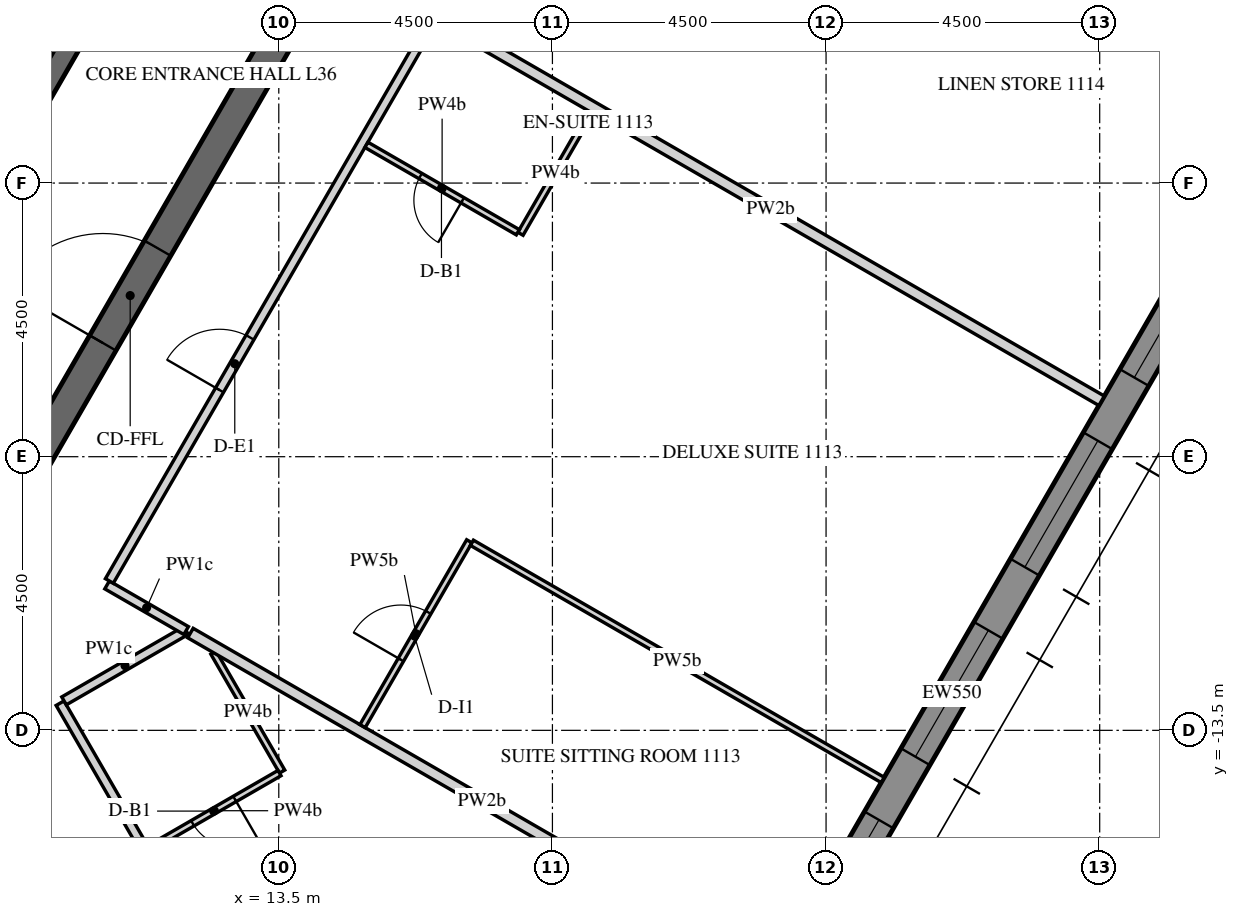
"""IFC4 building model, lengths in metres.
Left out: names, types, materials, properties, quantities, classifications, styles, units other than length and angle.
Written with IfcOpenShell. Run it as: python <this file> out.ifc"""

import sys

from ifc_helpers import new_model, si_unit, direction, frame, frame_2d, origin, place, context, subcontext, project, spatial, polyline, rectangle, outline, extrude, element, fill, save


model = new_model("IFC4")
c1 = context("Model", 3, precision=1e-05, world=origin(), true_north=direction((0.0, 1.0)))
c2 = subcontext(c1, "Body", "Model", "MODEL_VIEW")
j1 = project(units=[si_unit("LENGTHUNIT", "METRE"), si_unit("PLANEANGLEUNIT", "RADIAN")], contexts=[c1])
p1 = place(None, origin())
s1 = spatial("IfcSite", under=j1, at=p1, CompositionType="ELEMENT")
p2 = place(p1, origin())
s2 = spatial("IfcBuilding", under=s1, at=p2, CompositionType="ELEMENT")
p3 = place(p2, frame((0.0, 0.0, 156.6)))
s3 = spatial("IfcBuildingStorey", under=s2, at=p3, CompositionType="ELEMENT", Elevation=156.6)
p4 = place(p3, frame((17.63, -24.914, -0.15), z_axis=(0.0, 0.0, 1.0), x_axis=(0.499998569178, 0.866026229868, 0.0)))
e1 = element("IfcWall", 1, at=p4, inside=s3, PredefinedType="SOLIDWALL", context=c2, shape_type="SweptSolid", body=[
    extrude(outline(polyline([(-0.022, -0.275), (27.783, -0.275), (27.732, 0.275), (0.022, 0.275), (-0.022, -0.275)])), origin(), (0.0, 0.0, 1.0), 3.9),
])
p5 = place(p4, frame((1.879, 0.0, 1.05)))
e2 = element("IfcOpeningElement", 2, at=p5, cuts=e1, PredefinedType="OPENING", context=c2, shape_type="SweptSolid", body=[
    extrude(rectangle(XDim=2.4, YDim=2.4, at=frame_2d((1.2, 1.2))), frame((0.0, 0.285, 0.0), z_axis=(0.0, -1.0, 0.0), x_axis=(1.0, 0.0, 0.0)), (0.0, 0.0, 1.0), 0.57),
])
p6 = place(p4, frame((5.479, 0.0, 1.05)))
e3 = element("IfcOpeningElement", 3, at=p6, cuts=e1, PredefinedType="OPENING", context=c2, shape_type="SweptSolid", body=[
    extrude(rectangle(XDim=2.4, YDim=2.4, at=frame_2d((1.2, 1.2))), frame((0.0, 0.285, 0.0), z_axis=(0.0, -1.0, 0.0), x_axis=(1.0, 0.0, 0.0)), (0.0, 0.0, 1.0), 0.57),
])
p7 = place(p4, frame((9.079, 0.0, 1.05)))
e4 = element("IfcOpeningElement", 4, at=p7, cuts=e1, PredefinedType="OPENING", context=c2, shape_type="SweptSolid", body=[
    extrude(rectangle(XDim=2.4, YDim=2.4, at=frame_2d((1.2, 1.2))), frame((0.0, 0.285, 0.0), z_axis=(0.0, -1.0, 0.0), x_axis=(1.0, 0.0, 0.0)), (0.0, 0.0, 1.0), 0.57),
])
p8 = place(p4, frame((12.679, 0.0, 1.05)))
e5 = element("IfcOpeningElement", 5, at=p8, cuts=e1, PredefinedType="OPENING", context=c2, shape_type="SweptSolid", body=[
    extrude(rectangle(XDim=2.4, YDim=2.4, at=frame_2d((1.2, 1.2))), frame((0.0, 0.285, 0.0), z_axis=(0.0, -1.0, 0.0), x_axis=(1.0, 0.0, 0.0)), (0.0, 0.0, 1.0), 0.57),
])
p9 = place(p4, frame((16.279, 0.0, 1.05)))
e6 = element("IfcOpeningElement", 6, at=p9, cuts=e1, PredefinedType="OPENING", context=c2, shape_type="SweptSolid", body=[
    extrude(rectangle(XDim=2.4, YDim=2.4, at=frame_2d((1.2, 1.2))), frame((0.0, 0.285, 0.0), z_axis=(0.0, -1.0, 0.0), x_axis=(1.0, 0.0, 0.0)), (0.0, 0.0, 1.0), 0.57),
])
p10 = place(p4, frame((19.879, 0.0, 1.05)))
e7 = element("IfcOpeningElement", 7, at=p10, cuts=e1, PredefinedType="OPENING", context=c2, shape_type="SweptSolid", body=[
    extrude(rectangle(XDim=2.4, YDim=2.4, at=frame_2d((1.2, 1.2))), frame((0.0, 0.285, 0.0), z_axis=(0.0, -1.0, 0.0), x_axis=(1.0, 0.0, 0.0)), (0.0, 0.0, 1.0), 0.57),
])
p11 = place(p4, frame((23.479, 0.0, 1.05)))
e8 = element("IfcOpeningElement", 8, at=p11, cuts=e1, PredefinedType="OPENING", context=c2, shape_type="SweptSolid", body=[
    extrude(rectangle(XDim=2.4, YDim=2.4, at=frame_2d((1.2, 1.2))), frame((0.0, 0.285, 0.0), z_axis=(0.0, -1.0, 0.0), x_axis=(1.0, 0.0, 0.0)), (0.0, 0.0, 1.0), 0.57),
])
p12 = place(p3, frame((7.361, -12.75, -0.15), z_axis=(0.0, 0.0, 1.0), x_axis=(0.50000571537, 0.866022103989, 0.0)))
e9 = element("IfcWall", 9, at=p12, inside=s3, PredefinedType="SHEAR", context=c2, shape_type="SweptSolid", body=[
    extrude(outline(polyline([(-0.144, -0.25), (14.867, -0.25), (14.578, 0.25), (0.144, 0.25), (-0.144, -0.25)])), origin(), (0.0, 0.0, 1.0), 3.9),
])
p13 = place(p12, frame((6.49, 0.0, 0.15)))
e10 = element("IfcOpeningElement", 10, at=p13, cuts=e9, PredefinedType="OPENING", context=c2, shape_type="SweptSolid", body=[
    extrude(rectangle(XDim=1.8, YDim=2.4, at=frame_2d((0.9, 1.2))), frame((0.0, 0.26, 0.0), z_axis=(0.0, -1.0, 0.0), x_axis=(1.0, 0.0, 0.0)), (0.0, 0.0, 1.0), 0.52),
])
p14 = place(p3, frame((7.506, -13.0, -0.15), z_axis=(0.0, 0.0, 1.0), x_axis=(0.499988271576, -0.866032175087, 0.0)))
e11 = element("IfcWall", 11, at=p14, inside=s3, PredefinedType="SHEAR", context=c2, shape_type="SweptSolid", body=[
    extrude(rectangle(XDim=15.424, YDim=0.5, at=frame_2d((7.712, 0.0))), origin(), (0.0, 0.0, 1.0), 3.9),
])
p15 = place(p14, frame((6.812, 0.0, 0.15)))
e12 = element("IfcOpeningElement", 12, at=p15, cuts=e11, PredefinedType="OPENING", context=c2, shape_type="SweptSolid", body=[
    extrude(rectangle(XDim=1.8, YDim=2.4, at=frame_2d((0.9, 1.2))), frame((0.0, 0.26, 0.0), z_axis=(0.0, -1.0, 0.0), x_axis=(1.0, 0.0, 0.0)), (0.0, 0.0, 1.0), 0.52),
])
p16 = place(p3, frame((5.673, -9.825, -0.15), z_axis=(0.0, 0.0, 1.0), x_axis=(0.499995046907, 0.866028263435, 0.0)))
e13 = element("IfcWall", 13, at=p16, inside=s3, PredefinedType="SHEAR", context=c2, shape_type="SweptSolid", body=[
    extrude(outline(polyline([(-0.101, -0.175), (11.446, -0.175), (11.244, 0.175), (0.101, 0.175), (-0.101, -0.175)])), origin(), (0.0, 0.0, 1.0), 3.9),
])
p17 = place(p16, frame((4.801, 0.0, 0.15)))
e14 = element("IfcOpeningElement", 14, at=p17, cuts=e13, PredefinedType="OPENING", context=c2, shape_type="SweptSolid", body=[
    extrude(rectangle(XDim=1.8, YDim=2.4, at=frame_2d((0.9, 1.2))), frame((0.0, 0.185, 0.0), z_axis=(0.0, -1.0, 0.0), x_axis=(1.0, 0.0, 0.0)), (0.0, 0.0, 1.0), 0.37),
])
p18 = place(p3, frame((6.178, -14.8, 0.0), z_axis=(0.0, 0.0, 1.0), x_axis=(0.499984309814, -0.866034462328, 0.0)))
e15 = element("IfcWall", 15, at=p18, inside=s3, PredefinedType="PARTITIONING", context=c2, shape_type="SweptSolid", body=[
    extrude(rectangle(XDim=8.017, YDim=0.15, at=frame_2d((4.008, 0.0))), origin(), (0.0, 0.0, 1.0), 2.823),
])
p19 = place(p3, frame((13.699, -19.628, 0.0), z_axis=(0.0, 0.0, 1.0), x_axis=(-0.499998968938, 0.866025999068, 0.0)))
e16 = element("IfcWall", 16, at=p19, inside=s3, PredefinedType="PARTITIONING", context=c2, shape_type="SweptSolid", body=[
    extrude(rectangle(XDim=7.592, YDim=0.15, at=frame_2d((3.796, 0.0))), origin(), (0.0, 0.0, 1.0), 2.823),
])
p20 = place(p19, frame((2.033, 0.0, 0.0)))
e17 = element("IfcOpeningElement", 17, at=p20, cuts=e16, PredefinedType="OPENING", context=c2, shape_type="SweptSolid", body=[
    extrude(rectangle(XDim=1.0, YDim=2.1, at=frame_2d((0.5, 1.05))), frame((0.0, 0.085, 0.0), z_axis=(0.0, -1.0, 0.0), x_axis=(1.0, 0.0, 0.0)), (0.0, 0.0, 1.0), 0.17),
])
p21 = place(p3, frame((9.968, -13.016, 0.0), z_axis=(0.0, 0.0, 1.0), x_axis=(0.866022320763, 0.500005339912, 0.0)))
e18 = element("IfcWall", 18, at=p21, inside=s3, PredefinedType="PARTITIONING", context=c2, shape_type="SweptSolid", body=[
    extrude(rectangle(XDim=2.316, YDim=0.15, at=frame_2d((1.158, 0.0))), origin(), (0.0, 0.0, 1.0), 2.823),
])
p22 = place(p3, frame((11.977, -11.859, 0.0), z_axis=(0.0, 0.0, 1.0), x_axis=(-0.865993364801, 0.500055489042, 0.0)))
e19 = element("IfcWall", 19, at=p22, inside=s3, PredefinedType="PARTITIONING", context=c2, shape_type="SweptSolid", body=[
    extrude(rectangle(XDim=1.502, YDim=0.15, at=frame_2d((0.751, 0.0))), origin(), (0.0, 0.0, 1.0), 2.823),
])
p23 = place(p3, frame((10.714, -11.043, 0.0), z_axis=(0.0, 0.0, 1.0), x_axis=(0.500001980452, 0.866024260367, 0.0)))
e20 = element("IfcWall", 20, at=p23, inside=s3, PredefinedType="PARTITIONING", context=c2, shape_type="SweptSolid", body=[
    extrude(rectangle(XDim=12.752, YDim=0.15, at=frame_2d((6.376, 0.0))), origin(), (0.0, 0.0, 1.0), 2.823),
])
p24 = place(p23, frame((3.625, 0.0, 0.0)))
e21 = element("IfcOpeningElement", 21, at=p24, cuts=e20, PredefinedType="OPENING", context=c2, shape_type="SweptSolid", body=[
    extrude(rectangle(XDim=1.0, YDim=2.1, at=frame_2d((0.5, 1.05))), frame((0.0, 0.085, 0.0), z_axis=(0.0, -1.0, 0.0), x_axis=(1.0, 0.0, 0.0)), (0.0, 0.0, 1.0), 0.17),
])
p25 = place(p23, frame((11.602, 0.0, 0.0)))
e22 = element("IfcOpeningElement", 22, at=p25, cuts=e20, PredefinedType="OPENING", context=c2, shape_type="SweptSolid", body=[
    extrude(rectangle(XDim=1.0, YDim=2.1, at=frame_2d((0.5, 1.05))), frame((0.0, 0.085, 0.0), z_axis=(0.0, -1.0, 0.0), x_axis=(1.0, 0.0, 0.0)), (0.0, 0.0, 1.0), 0.17),
])
p26 = place(p3, frame((12.426, -12.223, 0.0), z_axis=(0.0, 0.0, 1.0), x_axis=(0.499919032186, -0.866072145528, 0.0)))
e23 = element("IfcWall", 23, at=p26, inside=s3, PredefinedType="PARTITIONING", context=c2, shape_type="SweptSolid", body=[
    extrude(rectangle(XDim=2.258, YDim=0.1, at=frame_2d((1.129, 0.0))), origin(), (0.0, 0.0, 1.0), 2.823),
])
p27 = place(p3, frame((13.512, -14.203, 0.0), z_axis=(0.0, 0.0, 1.0), x_axis=(-0.866006523861, -0.500032699561, 0.0)))
e24 = element("IfcWall", 24, at=p27, inside=s3, PredefinedType="PARTITIONING", context=c2, shape_type="SweptSolid", body=[
    extrude(rectangle(XDim=2.475, YDim=0.1, at=frame_2d((1.237, 0.0))), origin(), (0.0, 0.0, 1.0), 2.823),
])
p28 = place(p27, frame((0.85, 0.0, 0.0)))
e25 = element("IfcOpeningElement", 25, at=p28, cuts=e24, PredefinedType="OPENING", context=c2, shape_type="SweptSolid", body=[
    extrude(rectangle(XDim=0.8, YDim=2.1, at=frame_2d((0.4, 1.05))), frame((0.0, 0.06, 0.0), z_axis=(0.0, -1.0, 0.0), x_axis=(1.0, 0.0, 0.0)), (0.0, 0.0, 1.0), 0.12),
])
p29 = place(p3, frame((21.631, -17.433, 0.0), z_axis=(0.0, 0.0, 1.0), x_axis=(-0.866031296205, 0.499989793889, 0.0)))
e26 = element("IfcWall", 26, at=p29, inside=s3, PredefinedType="PARTITIONING", context=c2, shape_type="SweptSolid", body=[
    extrude(rectangle(XDim=11.067, YDim=0.18, at=frame_2d((5.534, 0.0))), origin(), (0.0, 0.0, 1.0), 2.823),
])
p30 = place(p3, frame((18.629, -3.333, 0.0), z_axis=(0.0, 0.0, 1.0), x_axis=(-0.500015210774, -0.866016621662, 0.0)))
e27 = element("IfcWall", 27, at=p30, inside=s3, PredefinedType="PARTITIONING", context=c2, shape_type="SweptSolid", body=[
    extrude(rectangle(XDim=2.31, YDim=0.1, at=frame_2d((1.155, 0.0))), origin(), (0.0, 0.0, 1.0), 2.823),
])
p31 = place(p3, frame((17.431, -5.309, 0.0), z_axis=(0.0, 0.0, 1.0), x_axis=(-0.866018712932, 0.500011588718, 0.0)))
e28 = element("IfcWall", 28, at=p31, inside=s3, PredefinedType="PARTITIONING", context=c2, shape_type="SweptSolid", body=[
    extrude(rectangle(XDim=2.875, YDim=0.1, at=frame_2d((1.438, 0.0))), origin(), (0.0, 0.0, 1.0), 2.823),
])
p32 = place(p31, frame((1.05, 0.0, 0.0)))
e29 = element("IfcOpeningElement", 29, at=p32, cuts=e28, PredefinedType="OPENING", context=c2, shape_type="SweptSolid", body=[
    extrude(rectangle(XDim=0.8, YDim=2.1, at=frame_2d((0.4, 1.05))), frame((0.0, 0.06, 0.0), z_axis=(0.0, -1.0, 0.0), x_axis=(1.0, 0.0, 0.0)), (0.0, 0.0, 1.0), 0.12),
])
p33 = place(p3, frame((14.878, -13.43, 0.0), z_axis=(0.0, 0.0, 1.0), x_axis=(0.500021481416, 0.866013001128, 0.0)))
e30 = element("IfcWall", 30, at=p33, inside=s3, PredefinedType="PARTITIONING", context=c2, shape_type="SweptSolid", body=[
    extrude(rectangle(XDim=3.51, YDim=0.1, at=frame_2d((1.755, 0.0))), origin(), (0.0, 0.0, 1.0), 2.823),
])
p34 = place(p33, frame((1.26, 0.0, 0.0)))
e31 = element("IfcOpeningElement", 31, at=p34, cuts=e30, PredefinedType="OPENING", context=c2, shape_type="SweptSolid", body=[
    extrude(rectangle(XDim=0.9, YDim=2.1, at=frame_2d((0.45, 1.05))), frame((0.0, 0.06, 0.0), z_axis=(0.0, -1.0, 0.0), x_axis=(1.0, 0.0, 0.0)), (0.0, 0.0, 1.0), 0.12),
])
p35 = place(p3, frame((16.676, -10.416, 0.0), z_axis=(0.0, 0.0, 1.0), x_axis=(0.866034953203, -0.499983459557, 0.0)))
e32 = element("IfcWall", 32, at=p35, inside=s3, PredefinedType="PARTITIONING", context=c2, shape_type="SweptSolid", body=[
    extrude(rectangle(XDim=7.8, YDim=0.1, at=frame_2d((3.9, 0.0))), origin(), (0.0, 0.0, 1.0), 2.823),
])
p36 = place(p3, frame((27.031, -8.08, 0.0), z_axis=(0.0, 0.0, 1.0), x_axis=(-0.86602780907, 0.499995833901, 0.0)))
e33 = element("IfcWall", 33, at=p36, inside=s3, PredefinedType="PARTITIONING", context=c2, shape_type="SweptSolid", body=[
    extrude(rectangle(XDim=12.575, YDim=0.18, at=frame_2d((6.287, 0.0))), origin(), (0.0, 0.0, 1.0), 2.823),
])
p37 = place(p7, frame((0.0, 0.205, 0.0)))
e34 = element("IfcWindow", 34, at=p37, inside=s3, PartitioningType="DOUBLE_PANEL_VERTICAL", PredefinedType="WINDOW", context=c2, shape_type="SweptSolid", body=[
    extrude(rectangle(XDim=2.4, YDim=2.4, at=frame_2d((1.2, 1.2))), frame((0.0, 0.03, 0.0), z_axis=(0.0, -1.0, 0.0), x_axis=(1.0, 0.0, 0.0)), (0.0, 0.0, 1.0), 0.06),
])
fill(e4, e34)
p38 = place(p8, frame((0.0, 0.205, 0.0)))
e35 = element("IfcWindow", 35, at=p38, inside=s3, PartitioningType="DOUBLE_PANEL_VERTICAL", PredefinedType="WINDOW", context=c2, shape_type="SweptSolid", body=[
    extrude(rectangle(XDim=2.4, YDim=2.4, at=frame_2d((1.2, 1.2))), frame((0.0, 0.03, 0.0), z_axis=(0.0, -1.0, 0.0), x_axis=(1.0, 0.0, 0.0)), (0.0, 0.0, 1.0), 0.06),
])
fill(e5, e35)
p39 = place(p9, frame((0.0, 0.205, 0.0)))
e36 = element("IfcWindow", 36, at=p39, inside=s3, PartitioningType="DOUBLE_PANEL_VERTICAL", PredefinedType="WINDOW", context=c2, shape_type="SweptSolid", body=[
    extrude(rectangle(XDim=2.4, YDim=2.4, at=frame_2d((1.2, 1.2))), frame((0.0, 0.03, 0.0), z_axis=(0.0, -1.0, 0.0), x_axis=(1.0, 0.0, 0.0)), (0.0, 0.0, 1.0), 0.06),
])
fill(e6, e36)
p40 = place(p10, frame((0.0, 0.205, 0.0)))
e37 = element("IfcWindow", 37, at=p40, inside=s3, PartitioningType="DOUBLE_PANEL_VERTICAL", PredefinedType="WINDOW", context=c2, shape_type="SweptSolid", body=[
    extrude(rectangle(XDim=2.4, YDim=2.4, at=frame_2d((1.2, 1.2))), frame((0.0, 0.03, 0.0), z_axis=(0.0, -1.0, 0.0), x_axis=(1.0, 0.0, 0.0)), (0.0, 0.0, 1.0), 0.06),
])
fill(e7, e37)
p41 = place(p13, origin())
e38 = element("IfcDoor", 38, at=p41, inside=s3, OperationType="DOUBLE_DOOR_SINGLE_SWING", PredefinedType="DOOR", context=c2, shape_type="SweptSolid", body=[
    extrude(rectangle(XDim=1.8, YDim=2.4, at=frame_2d((0.9, 1.2))), frame((0.0, 0.025, 0.0), z_axis=(0.0, -1.0, 0.0), x_axis=(1.0, 0.0, 0.0)), (0.0, 0.0, 1.0), 0.05),
])
fill(e10, e38)
p42 = place(p28, origin())
e39 = element("IfcDoor", 39, at=p42, inside=s3, OperationType="SINGLE_SWING_RIGHT", PredefinedType="DOOR", context=c2, shape_type="SweptSolid", body=[
    extrude(rectangle(XDim=0.8, YDim=2.1, at=frame_2d((0.4, 1.05))), frame((0.0, 0.025, 0.0), z_axis=(0.0, -1.0, 0.0), x_axis=(1.0, 0.0, 0.0)), (0.0, 0.0, 1.0), 0.05),
])
fill(e25, e39)
p43 = place(p24, origin())
e40 = element("IfcDoor", 40, at=p43, inside=s3, OperationType="SINGLE_SWING_RIGHT", PredefinedType="DOOR", context=c2, shape_type="SweptSolid", body=[
    extrude(rectangle(XDim=1.0, YDim=2.1, at=frame_2d((0.5, 1.05))), frame((0.0, 0.025, 0.0), z_axis=(0.0, -1.0, 0.0), x_axis=(1.0, 0.0, 0.0)), (0.0, 0.0, 1.0), 0.05),
])
fill(e21, e40)
p44 = place(p32, origin())
e41 = element("IfcDoor", 41, at=p44, inside=s3, OperationType="SINGLE_SWING_LEFT", PredefinedType="DOOR", context=c2, shape_type="SweptSolid", body=[
    extrude(rectangle(XDim=0.8, YDim=2.1, at=frame_2d((0.4, 1.05))), frame((0.0, 0.025, 0.0), z_axis=(0.0, -1.0, 0.0), x_axis=(1.0, 0.0, 0.0)), (0.0, 0.0, 1.0), 0.05),
])
fill(e29, e41)
p45 = place(p34, origin())
e42 = element("IfcDoor", 42, at=p45, inside=s3, OperationType="SINGLE_SWING_RIGHT", PredefinedType="DOOR", context=c2, shape_type="SweptSolid", body=[
    extrude(rectangle(XDim=0.9, YDim=2.1, at=frame_2d((0.45, 1.05))), frame((0.0, 0.025, 0.0), z_axis=(0.0, -1.0, 0.0), x_axis=(1.0, 0.0, 0.0)), (0.0, 0.0, 1.0), 0.05),
])
fill(e31, e42)
save(model, sys.argv[1])
